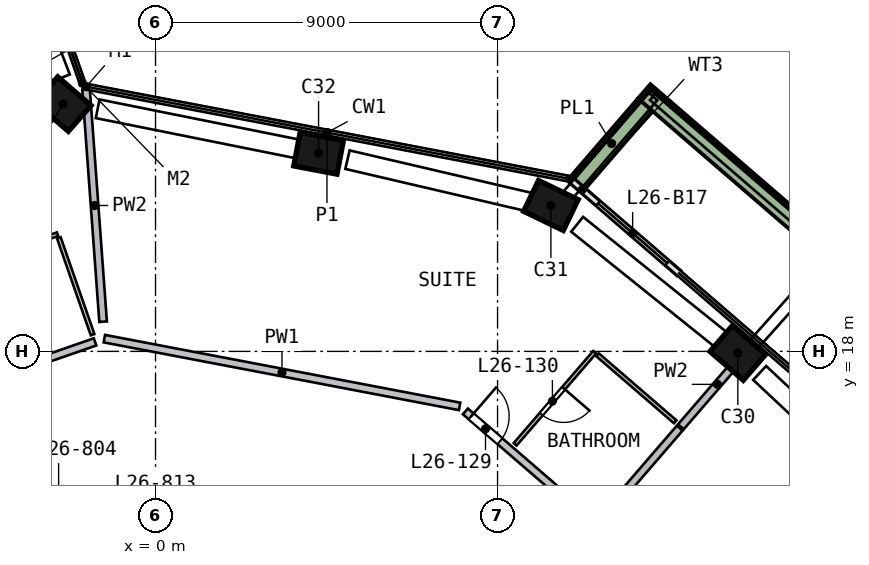
"""IFC4 building model, lengths in metres.
Left out: names, types, materials, properties, quantities, classifications, styles, units other than length and angle.
Written with IfcOpenShell. Run it as: python <this file> out.ifc"""

import sys

from ifc_helpers import new_model, si_unit, direction, frame, frame_2d, origin, origin_2d, place, context, subcontext, project, spatial, rectangle, extrude, element, fill, save


model = new_model("IFC4")
c1 = context("Model", 3, precision=1e-05, world=origin(), true_north=direction((0.0, 1.0)))
c2 = subcontext(c1, "Body", "Model", "MODEL_VIEW")
j1 = project(units=[si_unit("LENGTHUNIT", "METRE"), si_unit("PLANEANGLEUNIT", "RADIAN")], contexts=[c1])
p1 = place(None, origin())
s1 = spatial("IfcSite", under=j1, at=p1, CompositionType="ELEMENT")
p2 = place(p1, origin())
s2 = spatial("IfcBuilding", under=s1, at=p2, CompositionType="ELEMENT")
p3 = place(p2, frame((0.0, 0.0, 111.5)))
s3 = spatial("IfcBuildingStorey", under=s2, at=p3, CompositionType="ELEMENT", Elevation=111.5)
p4 = place(p3, frame((15.426, 17.871, 0.0), z_axis=(-0.085632411, 0.072703894, 0.993670586), x_axis=(-0.751997746, 0.649524072, -0.112329288)))
e1 = element("IfcColumn", 1, at=p4, inside=s3, PredefinedType="COLUMN", context=c2, shape_type="SweptSolid", body=[
    extrude(rectangle(XDim=1.15, YDim=0.9, at=origin_2d()), origin(), (0.0, 0.0, 1.0), 3.21),
])
p5 = place(p3, frame((10.529, 21.781, 0.0), z_axis=(-0.103928397, 0.049265254, 0.993363893), x_axis=(0.893975897, -0.433104905, 0.115009722)))
e2 = element("IfcColumn", 2, at=p5, inside=s3, PredefinedType="COLUMN", context=c2, shape_type="SweptSolid", body=[
    extrude(rectangle(XDim=1.15, YDim=0.9, at=origin_2d()), origin(), (0.0, 0.0, 1.0), 3.211),
])
p6 = place(p3, frame((4.424, 23.19, 0.0), z_axis=(-0.110501083, 0.020077279, 0.993673193), x_axis=(-0.976124643, 0.185924691, -0.112306232)))
e3 = element("IfcColumn", 3, at=p6, inside=s3, PredefinedType="COLUMN", context=c2, shape_type="SweptSolid", body=[
    extrude(rectangle(XDim=1.15, YDim=0.9, at=origin_2d()), origin(), (0.0, 0.0, 1.0), 3.21),
])
p7 = place(p3, frame((-2.292, 24.522, 0.0), z_axis=(-0.116519812, -0.01193321, 0.993116676), x_axis=(0.750371365, -0.656138694, 0.080155023)))
e4 = element("IfcColumn", 4, at=p7, inside=s3, PredefinedType="COLUMN", context=c2, shape_type="SweptSolid", body=[
    extrude(rectangle(XDim=1.15, YDim=0.9, at=origin_2d()), origin(), (0.0, 0.0, 1.0), 3.212),
])
p8 = place(p3, frame((13.766, 20.064, 0.0), z_axis=(0.0, 0.0, 1.0), x_axis=(-0.756994614, 0.653421116, 0.0)))
e5 = element("IfcWall", 5, at=p8, inside=s3, PredefinedType="SOLIDWALL", context=c2, shape_type="SweptSolid", body=[
    extrude(rectangle(XDim=3.71, YDim=0.15, at=frame_2d((1.855, 0.0))), origin(), (0.0, 0.0, 1.0), 2.425),
])
p9 = place(p8, frame((0.4, 0.0, 0.0)))
e6 = element("IfcOpeningElement", 6, at=p9, cuts=e5, PredefinedType="OPENING", context=c2, shape_type="SweptSolid", body=[
    extrude(rectangle(XDim=2.4, YDim=2.4, at=frame_2d((1.2, 1.2))), frame((0.0, 0.085, 0.0), z_axis=(0.0, -1.0, 0.0), x_axis=(1.0, 0.0, 0.0)), (0.0, 0.0, 1.0), 0.17),
])
p10 = place(p3, frame((23.247, 15.877, 0.0), z_axis=(0.0, 0.0, 1.0), x_axis=(-0.757002985, 0.653411418, 0.0)))
e7 = element("IfcWall", 7, at=p10, inside=s3, PredefinedType="SOLIDWALL", context=c2, shape_type="SweptSolid", body=[
    extrude(rectangle(XDim=13.723, YDim=0.5, at=frame_2d((6.862, 0.0))), origin(), (0.0, 0.0, 1.0), 0.7),
])
p11 = place(p3, frame((12.884, 24.491, 0.0), z_axis=(0.0, 0.0, 1.0), x_axis=(-0.65337255, -0.757036532, 0.0)))
e8 = element("IfcWall", 8, at=p11, inside=s3, PredefinedType="SOLIDWALL", context=c2, shape_type="SweptSolid", body=[
    extrude(rectangle(XDim=2.699, YDim=0.5, at=frame_2d((1.35, 0.0))), origin(), (0.0, 0.0, 1.0), 0.7),
])
p12 = place(p3, frame((-1.59, 18.25, 0.0), z_axis=(0.0, 0.0, 1.0), x_axis=(-0.944376615, -0.328865944, 0.0)))
e9 = element("IfcWall", 9, at=p12, inside=s3, PredefinedType="SOLIDWALL", context=c2, shape_type="SweptSolid", body=[
    extrude(rectangle(XDim=3.4, YDim=0.2, at=frame_2d((1.7, 0.0))), origin(), (0.0, 0.0, 1.0), 3.19),
])
p13 = place(p3, frame((8.001, 16.552, 0.0), z_axis=(0.0, 0.0, 1.0), x_axis=(-0.982286432, 0.187385606, 0.0)))
e10 = element("IfcWall", 10, at=p13, inside=s3, PredefinedType="SOLIDWALL", context=c2, shape_type="SweptSolid", body=[
    extrude(rectangle(XDim=9.516, YDim=0.2, at=frame_2d((4.758, 0.0))), origin(), (0.0, 0.0, 1.0), 3.19),
])
p14 = place(p3, frame((8.153, 16.421, 0.0), z_axis=(0.0, 0.0, 1.0), x_axis=(0.757004243, -0.65340996, 0.0)))
e11 = element("IfcWall", 11, at=p14, inside=s3, PredefinedType="SOLIDWALL", context=c2, shape_type="SweptSolid", body=[
    extrude(rectangle(XDim=9.116, YDim=0.2, at=frame_2d((4.558, 0.0))), origin(), (0.0, 0.0, 1.0), 3.19),
])
p15 = place(p14, frame((0.2, 0.0, 0.0)))
e12 = element("IfcOpeningElement", 12, at=p15, cuts=e11, PredefinedType="OPENING", context=c2, shape_type="SweptSolid", body=[
    extrude(rectangle(XDim=1.0, YDim=2.1, at=frame_2d((0.5, 1.05))), frame((0.0, 0.11, 0.0), z_axis=(0.0, -1.0, 0.0), x_axis=(1.0, 0.0, 0.0)), (0.0, 0.0, 1.0), 0.22),
])
p16 = place(p3, frame((-1.828, 24.897, 0.0), z_axis=(0.0, 0.0, 1.0), x_axis=(0.073258648, -0.997312975, 0.0)))
e13 = element("IfcWall", 13, at=p16, inside=s3, PredefinedType="SOLIDWALL", context=c2, shape_type="SweptSolid", body=[
    extrude(rectangle(XDim=6.132, YDim=0.2, at=frame_2d((3.066, 0.0))), origin(), (0.0, 0.0, 1.0), 3.19),
])
p17 = place(p3, frame((11.896, 13.781, 0.0), z_axis=(0.0, 0.0, 1.0), x_axis=(0.653390076, 0.757021406, 0.0)))
e14 = element("IfcWall", 14, at=p17, inside=s3, PredefinedType="SOLIDWALL", context=c2, shape_type="SweptSolid", body=[
    extrude(rectangle(XDim=2.905, YDim=0.2, at=frame_2d((1.452, 0.0))), origin(), (0.0, 0.0, 1.0), 3.19),
])
p18 = place(p3, frame((13.824, 16.015, 0.0), z_axis=(0.0, 0.0, 1.0), x_axis=(0.653389434, 0.75702196, 0.0)))
e15 = element("IfcWall", 15, at=p18, inside=s3, PredefinedType="SOLIDWALL", context=c2, shape_type="SweptSolid", body=[
    extrude(rectangle(XDim=2.952, YDim=0.2, at=frame_2d((1.476, 0.0))), origin(), (0.0, 0.0, 1.0), 3.19),
])
p19 = place(p3, frame((-2.577, 21.083, 0.0), z_axis=(0.0, 0.0, 1.0), x_axis=(-0.94439589, -0.328810589, 0.0)))
e16 = element("IfcWall", 16, at=p19, inside=s3, PredefinedType="PARTITIONING", context=c2, shape_type="SweptSolid", body=[
    extrude(rectangle(XDim=3.2, YDim=0.1, at=frame_2d((1.6, 0.0))), origin(), (0.0, 0.0, 1.0), 3.19),
])
p20 = place(p19, frame((1.25, 0.0, 0.0)))
e17 = element("IfcOpeningElement", 17, at=p20, cuts=e16, PredefinedType="OPENING", context=c2, shape_type="SweptSolid", body=[
    extrude(rectangle(XDim=0.9, YDim=2.1, at=frame_2d((0.45, 1.05))), frame((0.0, 0.06, 0.0), z_axis=(0.0, -1.0, 0.0), x_axis=(1.0, 0.0, 0.0)), (0.0, 0.0, 1.0), 0.12),
])
p21 = place(p3, frame((-1.656, 18.439, 0.0), z_axis=(0.0, 0.0, 1.0), x_axis=(-0.328867808, 0.944375966, 0.0)))
e18 = element("IfcWall", 18, at=p21, inside=s3, PredefinedType="PARTITIONING", context=c2, shape_type="SweptSolid", body=[
    extrude(rectangle(XDim=2.7, YDim=0.1, at=frame_2d((1.35, 0.0))), origin(), (0.0, 0.0, 1.0), 3.19),
])
p22 = place(p3, frame((11.554, 17.977, 0.0), z_axis=(0.0, 0.0, 1.0), x_axis=(-0.653401338, -0.757011685, 0.0)))
e19 = element("IfcWall", 19, at=p22, inside=s3, PredefinedType="PARTITIONING", context=c2, shape_type="SweptSolid", body=[
    extrude(rectangle(XDim=3.2, YDim=0.1, at=frame_2d((1.6, 0.0))), origin(), (0.0, 0.0, 1.0), 3.19),
])
p23 = place(p22, frame((1.25, 0.0, 0.0)))
e20 = element("IfcOpeningElement", 20, at=p23, cuts=e19, PredefinedType="OPENING", context=c2, shape_type="SweptSolid", body=[
    extrude(rectangle(XDim=0.9, YDim=2.1, at=frame_2d((0.45, 1.05))), frame((0.0, 0.06, 0.0), z_axis=(0.0, -1.0, 0.0), x_axis=(1.0, 0.0, 0.0)), (0.0, 0.0, 1.0), 0.12),
])
p24 = place(p3, frame((11.63, 17.912, 0.0), z_axis=(0.0, 0.0, 1.0), x_axis=(0.757018158, -0.653393838, 0.0)))
e21 = element("IfcWall", 21, at=p24, inside=s3, PredefinedType="PARTITIONING", context=c2, shape_type="SweptSolid", body=[
    extrude(rectangle(XDim=2.7, YDim=0.1, at=frame_2d((1.35, 0.0))), origin(), (0.0, 0.0, 1.0), 3.19),
])
p25 = place(p9, origin())
e22 = element("IfcDoor", 22, at=p25, inside=s3, OperationType="SLIDING_TO_RIGHT", PredefinedType="DOOR", context=c2, shape_type="SweptSolid", body=[
    extrude(rectangle(XDim=2.4, YDim=2.4, at=frame_2d((1.2, 1.2))), frame((0.0, 0.025, 0.0), z_axis=(0.0, -1.0, 0.0), x_axis=(1.0, 0.0, 0.0)), (0.0, 0.0, 1.0), 0.05),
])
fill(e6, e22)
p26 = place(p15, origin())
e23 = element("IfcDoor", 23, at=p26, inside=s3, OperationType="SINGLE_SWING_LEFT", PredefinedType="DOOR", context=c2, shape_type="SweptSolid", body=[
    extrude(rectangle(XDim=1.0, YDim=2.1, at=frame_2d((0.5, 1.05))), frame((0.0, 0.025, 0.0), z_axis=(0.0, -1.0, 0.0), x_axis=(1.0, 0.0, 0.0)), (0.0, 0.0, 1.0), 0.05),
])
fill(e12, e23)
p27 = place(p23, origin())
e24 = element("IfcDoor", 24, at=p27, inside=s3, OperationType="SINGLE_SWING_LEFT", PredefinedType="DOOR", context=c2, shape_type="SweptSolid", body=[
    extrude(rectangle(XDim=0.9, YDim=2.1, at=frame_2d((0.45, 1.05))), frame((0.0, 0.025, 0.0), z_axis=(0.0, -1.0, 0.0), x_axis=(1.0, 0.0, 0.0)), (0.0, 0.0, 1.0), 0.05),
])
fill(e20, e24)
save(model, sys.argv[1])
